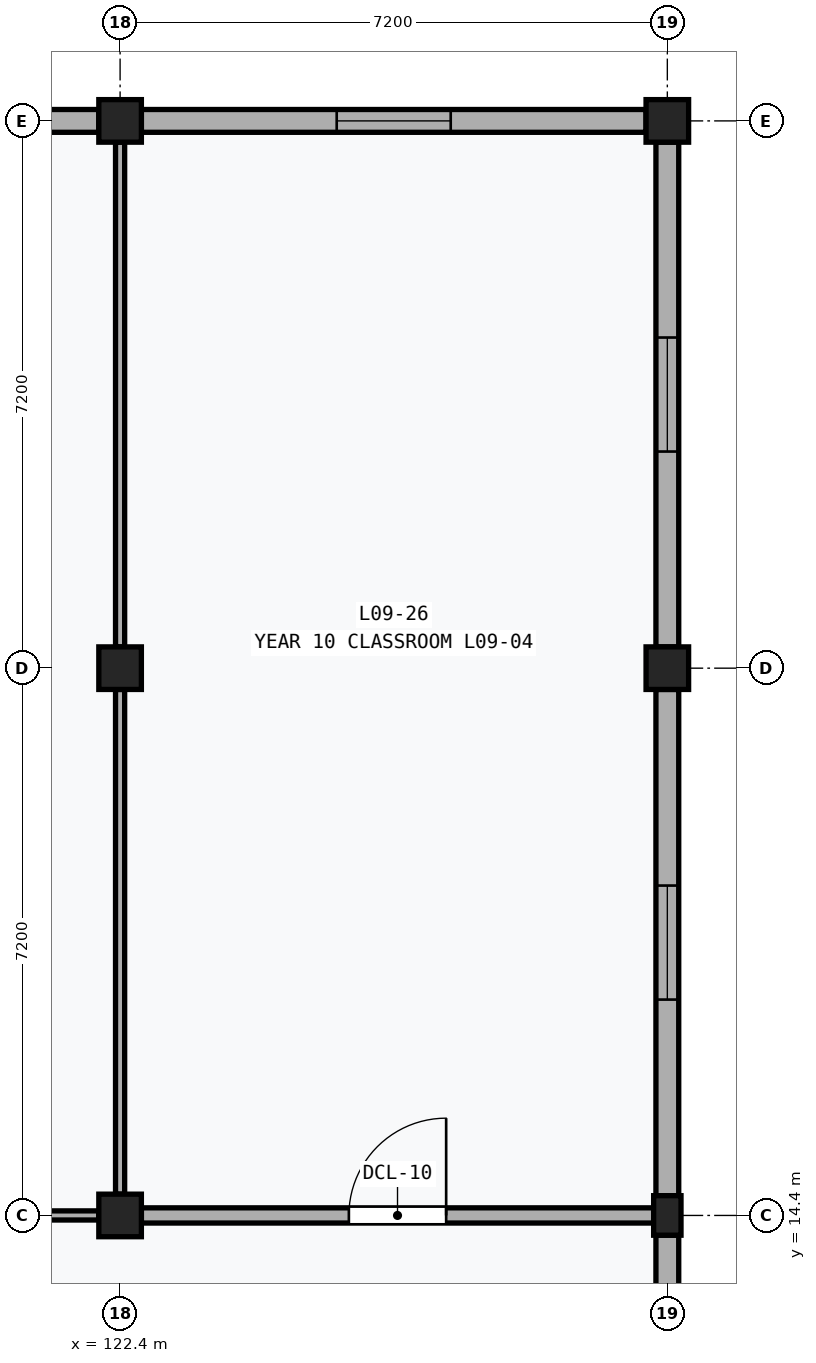
"""IFC4 building model, lengths in metres.
Left out: names, types, materials, properties, quantities, classifications, styles, units other than length and angle.
Written with IfcOpenShell. Run it as: python <this file> out.ifc"""

import sys

from ifc_helpers import new_model, si_unit, direction, frame, frame_2d, origin, origin_2d, place, context, subcontext, project, spatial, rectangle, extrude, element, fill, save


model = new_model("IFC4")
c1 = context("Model", 3, precision=1e-05, world=origin(), true_north=direction((0.0, 1.0)))
c2 = subcontext(c1, "Body", "Model", "MODEL_VIEW")
j1 = project(units=[si_unit("LENGTHUNIT", "METRE"), si_unit("PLANEANGLEUNIT", "RADIAN")], contexts=[c1])
p1 = place(None, origin())
s1 = spatial("IfcSite", under=j1, at=p1, CompositionType="ELEMENT")
p2 = place(p1, origin())
s2 = spatial("IfcBuilding", under=s1, at=p2, CompositionType="ELEMENT")
p3 = place(p2, frame((0.0, 0.0, 38.8)))
s3 = spatial("IfcBuildingStorey", under=s2, at=p3, CompositionType="ELEMENT", Elevation=38.8)
for number, where, z_axis, x_axis in (
    (1, (122.4, 14.4, 0.0), (0.0, 0.0, 1.0), (1.0, 0.0, 0.0)),
    (2, (122.4, 21.6, 0.0), (0.0, 0.0, 1.0), (1.0, 0.0, 0.0)),
    (3, (122.4, 28.8, 0.0), (0.0, 0.0, 1.0), (1.0, 0.0, 0.0)),
):
    element("IfcColumn", number, at=place(p3, frame(where, z_axis=z_axis, x_axis=x_axis)), inside=s3, PredefinedType="COLUMN", context=c2, shape_type="SweptSolid", body=[
        extrude(rectangle(XDim=0.56, YDim=0.56, at=origin_2d()), origin(), (0.0, 0.0, 1.0), 4.0),
    ])
p4 = place(p3, frame((129.6, 14.4, 0.0), z_axis=(0.0, 0.0, 1.0), x_axis=(1.0, 0.0, 0.0)))
e4 = element("IfcColumn", 4, at=p4, inside=s3, PredefinedType="PILASTER", context=c2, shape_type="SweptSolid", body=[
    extrude(rectangle(XDim=0.36, YDim=0.52, at=origin_2d()), origin(), (0.0, 0.0, 1.0), 4.0),
])
for number, where, z_axis, x_axis in (
    (5, (129.6, 21.6, 0.0), (0.0, 0.0, 1.0), (1.0, 0.0, 0.0)),
    (6, (129.6, 28.8, 0.0), (0.0, 0.0, 1.0), (1.0, 0.0, 0.0)),
):
    element("IfcColumn", number, at=place(p3, frame(where, z_axis=z_axis, x_axis=x_axis)), inside=s3, PredefinedType="COLUMN", context=c2, shape_type="SweptSolid", body=[
        extrude(rectangle(XDim=0.56, YDim=0.56, at=origin_2d()), origin(), (0.0, 0.0, 1.0), 4.0),
    ])
p5 = place(p3, frame((115.38, 28.8, 0.0), z_axis=(0.0, 0.0, 1.0), x_axis=(1.0, 0.0, 0.0)))
e7 = element("IfcWall", 7, at=p5, inside=s3, PredefinedType="SOLIDWALL", context=c2, shape_type="SweptSolid", body=[
    extrude(rectangle(XDim=6.74, YDim=0.3, at=frame_2d((3.37, 0.0))), origin(), (0.0, 0.0, 1.0), 3.17),
])
p6 = place(p5, frame((2.62, 0.0, 1.1)))
e8 = element("IfcOpeningElement", 8, at=p6, cuts=e7, PredefinedType="OPENING", context=c2, shape_type="SweptSolid", body=[
    extrude(rectangle(XDim=1.5, YDim=1.35, at=frame_2d((0.75, 0.675))), frame((0.0, 0.162, 0.0), z_axis=(0.0, -1.0, 0.0), x_axis=(1.0, 0.0, 0.0)), (0.0, 0.0, 1.0), 0.324),
])
p7 = place(p3, frame((129.6, 7.48, 0.0), z_axis=(0.0, 0.0, 1.0), x_axis=(0.0, 1.0, 0.0)))
e9 = element("IfcWall", 9, at=p7, inside=s3, PredefinedType="SOLIDWALL", context=c2, shape_type="SweptSolid", body=[
    extrude(rectangle(XDim=6.66, YDim=0.3, at=frame_2d((3.33, 0.0))), origin(), (0.0, 0.0, 1.0), 3.17),
])
p8 = place(p7, frame((2.58, 0.0, 1.1)))
e10 = element("IfcOpeningElement", 10, at=p8, cuts=e9, PredefinedType="OPENING", context=c2, shape_type="SweptSolid", body=[
    extrude(rectangle(XDim=1.5, YDim=1.35, at=frame_2d((0.75, 0.675))), frame((0.0, 0.162, 0.0), z_axis=(0.0, -1.0, 0.0), x_axis=(1.0, 0.0, 0.0)), (0.0, 0.0, 1.0), 0.324),
])
p9 = place(p3, frame((129.6, 14.66, 0.0), z_axis=(0.0, 0.0, 1.0), x_axis=(0.0, 1.0, 0.0)))
e11 = element("IfcWall", 11, at=p9, inside=s3, PredefinedType="SOLIDWALL", context=c2, shape_type="SweptSolid", body=[
    extrude(rectangle(XDim=6.66, YDim=0.3, at=frame_2d((3.33, 0.0))), origin(), (0.0, 0.0, 1.0), 3.17),
])
p10 = place(p9, frame((2.58, 0.0, 1.1)))
e12 = element("IfcOpeningElement", 12, at=p10, cuts=e11, PredefinedType="OPENING", context=c2, shape_type="SweptSolid", body=[
    extrude(rectangle(XDim=1.5, YDim=1.35, at=frame_2d((0.75, 0.675))), frame((0.0, 0.162, 0.0), z_axis=(0.0, -1.0, 0.0), x_axis=(1.0, 0.0, 0.0)), (0.0, 0.0, 1.0), 0.324),
])
p11 = place(p3, frame((122.68, 28.8, 0.0), z_axis=(0.0, 0.0, 1.0), x_axis=(1.0, 0.0, 0.0)))
e13 = element("IfcWall", 13, at=p11, inside=s3, PredefinedType="SOLIDWALL", context=c2, shape_type="SweptSolid", body=[
    extrude(rectangle(XDim=6.64, YDim=0.3, at=frame_2d((3.32, 0.0))), origin(), (0.0, 0.0, 1.0), 3.17),
])
p12 = place(p11, frame((2.57, 0.0, 1.1)))
e14 = element("IfcOpeningElement", 14, at=p12, cuts=e13, PredefinedType="OPENING", context=c2, shape_type="SweptSolid", body=[
    extrude(rectangle(XDim=1.5, YDim=1.35, at=frame_2d((0.75, 0.675))), frame((0.0, 0.162, 0.0), z_axis=(0.0, -1.0, 0.0), x_axis=(1.0, 0.0, 0.0)), (0.0, 0.0, 1.0), 0.324),
])
p13 = place(p3, frame((129.6, 21.88, 0.0), z_axis=(0.0, 0.0, 1.0), x_axis=(0.0, 1.0, 0.0)))
e15 = element("IfcWall", 15, at=p13, inside=s3, PredefinedType="SOLIDWALL", context=c2, shape_type="SweptSolid", body=[
    extrude(rectangle(XDim=6.64, YDim=0.3, at=frame_2d((3.32, 0.0))), origin(), (0.0, 0.0, 1.0), 3.17),
])
p14 = place(p13, frame((2.57, 0.0, 1.1)))
e16 = element("IfcOpeningElement", 16, at=p14, cuts=e15, PredefinedType="OPENING", context=c2, shape_type="SweptSolid", body=[
    extrude(rectangle(XDim=1.5, YDim=1.35, at=frame_2d((0.75, 0.675))), frame((0.0, 0.162, 0.0), z_axis=(0.0, -1.0, 0.0), x_axis=(1.0, 0.0, 0.0)), (0.0, 0.0, 1.0), 0.324),
])
p15 = place(p3, frame((115.48, 14.4, 0.0), z_axis=(0.0, 0.0, 1.0), x_axis=(1.0, 0.0, 0.0)))
e17 = element("IfcWall", 17, at=p15, inside=s3, PredefinedType="MOVABLE", context=c2, shape_type="SweptSolid", body=[
    extrude(rectangle(XDim=6.64, YDim=0.12, at=frame_2d((3.32, 0.0))), origin(), (0.0, 0.0, 1.0), 3.01),
])
p16 = place(p15, frame((2.7, 0.0, 0.0)))
e18 = element("IfcOpeningElement", 18, at=p16, cuts=e17, PredefinedType="OPENING", context=c2, shape_type="SweptSolid", body=[
    extrude(rectangle(XDim=1.24, YDim=2.26, at=frame_2d((0.62, 1.13))), frame((0.0, 0.072, 0.0), z_axis=(0.0, -1.0, 0.0), x_axis=(1.0, 0.0, 0.0)), (0.0, 0.0, 1.0), 0.144),
])
for number, where, z_axis, x_axis in (
    (19, (122.4, 14.68, 0.0), (0.0, 0.0, 1.0), (0.0, 1.0, 0.0)),
    (20, (122.4, 21.88, 0.0), (0.0, 0.0, 1.0), (0.0, 1.0, 0.0)),
):
    element("IfcWall", number, at=place(p3, frame(where, z_axis=z_axis, x_axis=x_axis)), inside=s3, PredefinedType="MOVABLE", context=c2, shape_type="SweptSolid", body=[
        extrude(rectangle(XDim=6.64, YDim=0.12, at=frame_2d((3.32, 0.0))), origin(), (0.0, 0.0, 1.0), 3.01),
    ])
p17 = place(p3, frame((122.68, 14.4, 0.0), z_axis=(0.0, 0.0, 1.0), x_axis=(1.0, 0.0, 0.0)))
e21 = element("IfcWall", 21, at=p17, inside=s3, PredefinedType="PARTITIONING", context=c2, shape_type="SweptSolid", body=[
    extrude(rectangle(XDim=6.74, YDim=0.2, at=frame_2d((3.37, 0.0))), origin(), (0.0, 0.0, 1.0), 3.01),
])
p18 = place(p17, frame((2.73, 0.0, 0.0)))
e22 = element("IfcOpeningElement", 22, at=p18, cuts=e21, PredefinedType="OPENING", context=c2, shape_type="SweptSolid", body=[
    extrude(rectangle(XDim=1.28, YDim=2.28, at=frame_2d((0.64, 1.14))), frame((0.0, 0.112, 0.0), z_axis=(0.0, -1.0, 0.0), x_axis=(1.0, 0.0, 0.0)), (0.0, 0.0, 1.0), 0.224),
])
p19 = place(p10, origin())
e23 = element("IfcWindow", 23, at=p19, inside=s3, PartitioningType="SINGLE_PANEL", PredefinedType="WINDOW", context=c2, shape_type="SweptSolid", body=[
    extrude(rectangle(XDim=1.5, YDim=1.35, at=frame_2d((0.75, 0.675))), frame((0.0, 0.03, 0.0), z_axis=(0.0, -1.0, 0.0), x_axis=(1.0, 0.0, 0.0)), (0.0, 0.0, 1.0), 0.06),
])
fill(e12, e23)
p20 = place(p12, origin())
e24 = element("IfcWindow", 24, at=p20, inside=s3, PartitioningType="SINGLE_PANEL", PredefinedType="WINDOW", context=c2, shape_type="SweptSolid", body=[
    extrude(rectangle(XDim=1.5, YDim=1.35, at=frame_2d((0.75, 0.675))), frame((0.0, 0.03, 0.0), z_axis=(0.0, -1.0, 0.0), x_axis=(1.0, 0.0, 0.0)), (0.0, 0.0, 1.0), 0.06),
])
fill(e14, e24)
p21 = place(p14, origin())
e25 = element("IfcWindow", 25, at=p21, inside=s3, PartitioningType="SINGLE_PANEL", PredefinedType="WINDOW", context=c2, shape_type="SweptSolid", body=[
    extrude(rectangle(XDim=1.5, YDim=1.35, at=frame_2d((0.75, 0.675))), frame((0.0, 0.03, 0.0), z_axis=(0.0, -1.0, 0.0), x_axis=(1.0, 0.0, 0.0)), (0.0, 0.0, 1.0), 0.06),
])
fill(e16, e25)
p22 = place(p18, origin())
e26 = element("IfcDoor", 26, at=p22, inside=s3, OperationType="SINGLE_SWING_RIGHT", PredefinedType="DOOR", context=c2, shape_type="SweptSolid", body=[
    extrude(rectangle(XDim=1.28, YDim=2.28, at=frame_2d((0.64, 1.14))), frame((0.0, 0.025, 0.0), z_axis=(0.0, -1.0, 0.0), x_axis=(1.0, 0.0, 0.0)), (0.0, 0.0, 1.0), 0.05),
])
fill(e22, e26)
save(model, sys.argv[1])
